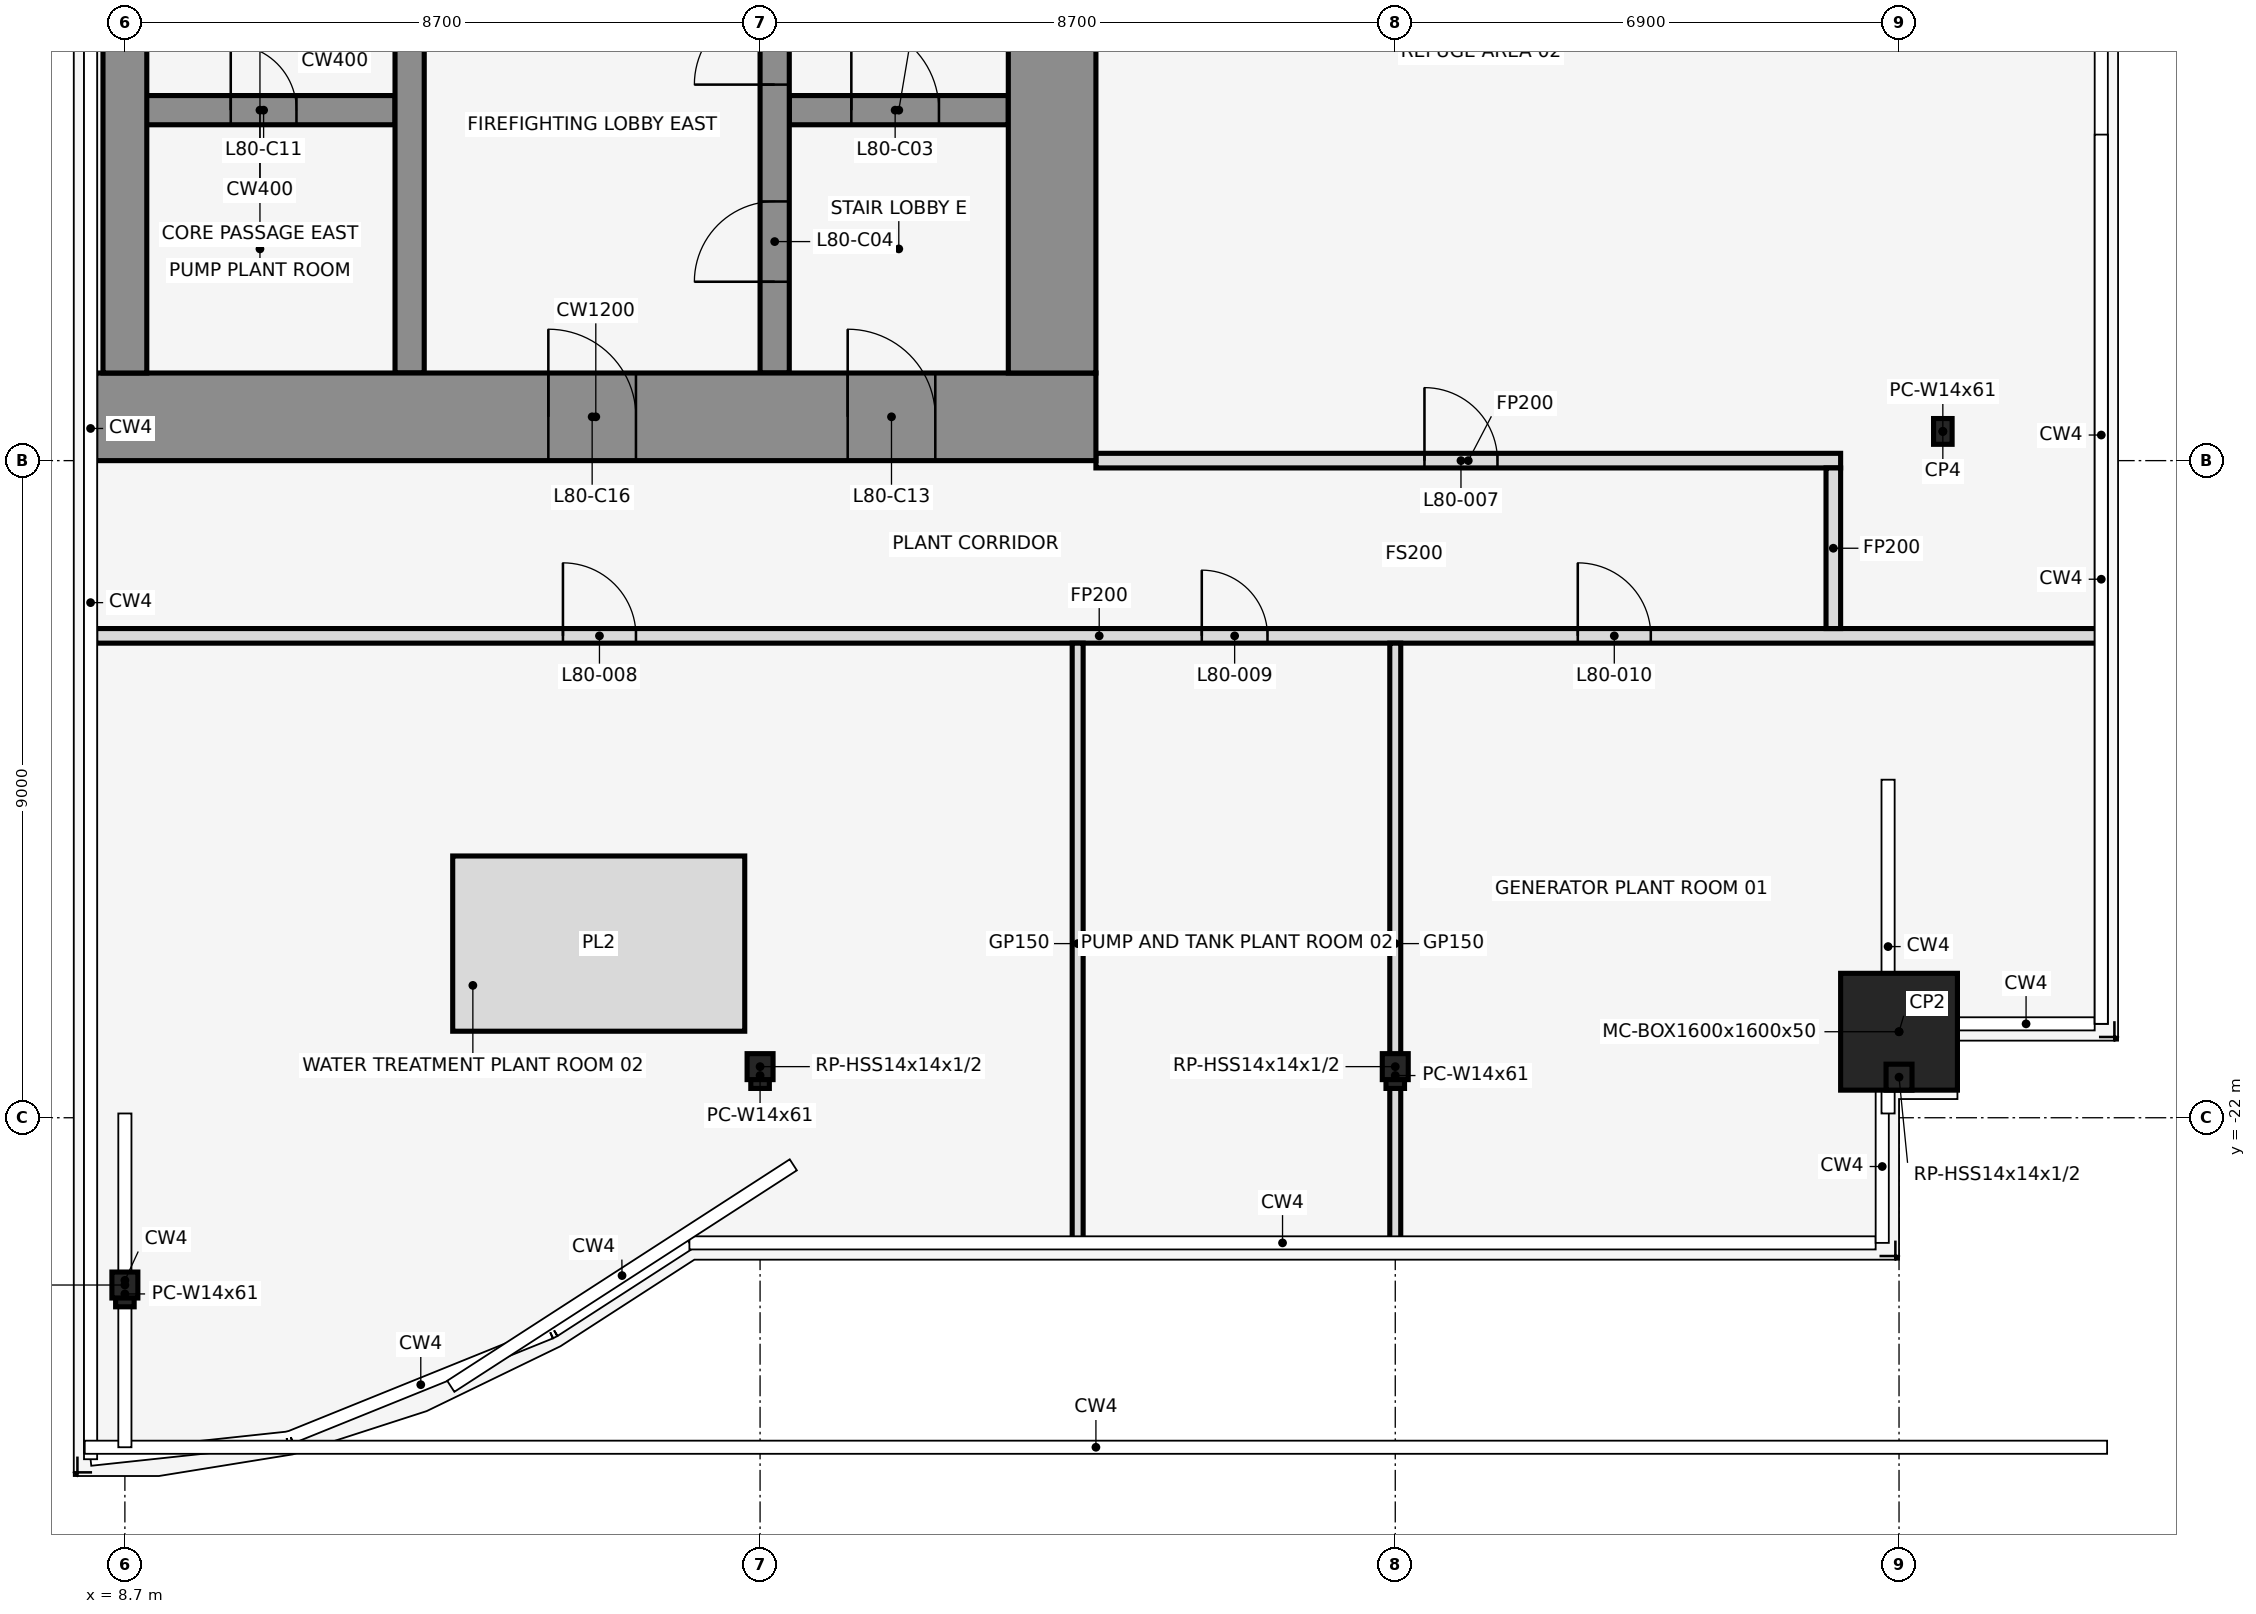
"""IFC4 building model, lengths in metres.
Left out: names, types, materials, properties, quantities, classifications, styles, units other than length and angle.
Written with IfcOpenShell. Run it as: python <this file> out.ifc"""

import sys

from ifc_helpers import new_model, si_unit, direction, frame, frame_2d, origin, origin_2d, place, context, subcontext, project, spatial, rectangle, hollow_rectangle, i_section, extrude, element, fill, save


model = new_model("IFC4")
c1 = context("Model", 3, precision=1e-05, world=origin(), true_north=direction((0.0, 1.0)))
c2 = subcontext(c1, "Body", "Model", "MODEL_VIEW")
j1 = project(units=[si_unit("LENGTHUNIT", "METRE"), si_unit("PLANEANGLEUNIT", "RADIAN")], contexts=[c1])
p1 = place(None, origin())
s1 = spatial("IfcSite", under=j1, at=p1, CompositionType="ELEMENT")
p2 = place(p1, origin())
s2 = spatial("IfcBuilding", under=s1, at=p2, CompositionType="ELEMENT")
p3 = place(p2, frame((0.0, 0.0, 356.9)))
s3 = spatial("IfcBuildingStorey", under=s2, at=p3, CompositionType="ELEMENT", Elevation=356.9)
for number, where, z_axis, x_axis in (
    (1, (8.7, -24.413, 0.0), (0.0, 0.0, 1.0), (1.0, 0.0, 0.0)),
    (2, (17.4, -21.422, 0.0), (0.0, 0.0, 1.0), (1.0, 0.0, 0.0)),
    (3, (26.1, -21.422, 0.0), (0.0, 0.0, 1.0), (1.0, 0.0, 0.0)),
):
    element("IfcColumn", number, at=place(p3, frame(where, z_axis=z_axis, x_axis=x_axis)), inside=s3, PredefinedType="COLUMN", context=c2, shape_type="SweptSolid", body=[
        extrude(i_section(OverallWidth=0.254, OverallDepth=0.353, WebThickness=0.01, FlangeThickness=0.016, at=origin_2d()), origin(), (0.0, 0.0, 1.0), 4.5),
    ])
p4 = place(p3, frame((33.0, -20.822, 0.0), z_axis=(0.0, 0.0, 1.0), x_axis=(1.0, 0.0, 0.0)))
e4 = element("IfcColumn", 4, at=p4, inside=s3, PredefinedType="COLUMN", context=c2, shape_type="SweptSolid", body=[
    extrude(hollow_rectangle(XDim=1.6, YDim=1.6, WallThickness=0.05, at=origin_2d()), origin(), (0.0, 0.0, 1.0), 4.5),
])
p5 = place(p3, frame((33.6, -12.6, 0.0), z_axis=(0.0, 0.0, 1.0), x_axis=(1.0, 0.0, 0.0)))
e5 = element("IfcColumn", 5, at=p5, inside=s3, PredefinedType="COLUMN", context=c2, shape_type="SweptSolid", body=[
    extrude(i_section(OverallWidth=0.254, OverallDepth=0.353, WebThickness=0.01, FlangeThickness=0.016, at=origin_2d()), origin(), (0.0, 0.0, 1.0), 4.5),
])
for number, where, z_axis, x_axis in (
    (6, (8.7, -24.291, 4.5), (0.0, 0.0, 1.0), (1.0, 0.0, 0.0)),
    (7, (17.4, -21.3, 4.5), (0.0, 0.0, 1.0), (1.0, 0.0, 0.0)),
):
    element("IfcColumn", number, at=place(p3, frame(where, z_axis=z_axis, x_axis=x_axis)), inside=s3, PredefinedType="COLUMN", context=c2, shape_type="SweptSolid", body=[
        extrude(hollow_rectangle(XDim=0.356, YDim=0.356, WallThickness=0.012, at=origin_2d()), origin(), (0.0, 0.0, 1.0), 3.682),
    ])
p6 = place(p3, frame((26.1, -21.3, 4.5), z_axis=(0.0, 0.0, 1.0), x_axis=(1.0, 0.0, 0.0)))
e8 = element("IfcColumn", 8, at=p6, inside=s3, PredefinedType="COLUMN", context=c2, shape_type="SweptSolid", body=[
    extrude(hollow_rectangle(XDim=0.356, YDim=0.356, WallThickness=0.012, at=origin_2d()), origin(), (0.0, 0.0, 1.0), 3.365),
])
p7 = place(p3, frame((33.0, -21.444, 4.516), z_axis=(0.0, 0.0, 1.0), x_axis=(1.0, 0.0, 0.0)))
e9 = element("IfcColumn", 9, at=p7, inside=s3, PredefinedType="COLUMN", context=c2, shape_type="SweptSolid", body=[
    extrude(hollow_rectangle(XDim=0.356, YDim=0.356, WallThickness=0.012, at=origin_2d()), origin(), (0.0, 0.0, 1.0), 3.348),
])
p8 = place(p3, frame((15.19, -19.615, 0.0), z_axis=(0.0, 0.0, 1.0), x_axis=(1.0, 0.0, 0.0)))
e10 = element("IfcWall", 10, at=p8, inside=s3, PredefinedType="USERDEFINED", context=c2, shape_type="SweptSolid", body=[
    extrude(rectangle(XDim=4.0, YDim=2.4, at=origin_2d()), origin(), (0.0, 0.0, 1.0), 0.2),
])
p9 = place(p3, frame((8.3, -15.4, 0.0), z_axis=(0.0, 0.0, 1.0), x_axis=(1.0, 0.0, 0.0)))
e11 = element("IfcWall", 11, at=p9, inside=s3, PredefinedType="PARTITIONING", context=c2, shape_type="SweptSolid", body=[
    extrude(rectangle(XDim=27.49, YDim=0.2, at=frame_2d((13.745, 0.0))), origin(), (0.0, 0.0, 1.0), 3.368),
])
p10 = place(p9, frame((6.4, 0.0, 0.0)))
e12 = element("IfcOpeningElement", 12, at=p10, cuts=e11, PredefinedType="OPENING", context=c2, shape_type="SweptSolid", body=[
    extrude(rectangle(XDim=1.0, YDim=2.1, at=frame_2d((0.5, 1.05))), frame((0.0, 0.112, 0.0), z_axis=(0.0, -1.0, 0.0), x_axis=(1.0, 0.0, 0.0)), (0.0, 0.0, 1.0), 0.224),
])
p11 = place(p9, frame((15.15, 0.0, 0.0)))
e13 = element("IfcOpeningElement", 13, at=p11, cuts=e11, PredefinedType="OPENING", context=c2, shape_type="SweptSolid", body=[
    extrude(rectangle(XDim=0.9, YDim=2.1, at=frame_2d((0.45, 1.05))), frame((0.0, 0.112, 0.0), z_axis=(0.0, -1.0, 0.0), x_axis=(1.0, 0.0, 0.0)), (0.0, 0.0, 1.0), 0.224),
])
p12 = place(p9, frame((20.3, 0.0, 0.0)))
e14 = element("IfcOpeningElement", 14, at=p12, cuts=e11, PredefinedType="OPENING", context=c2, shape_type="SweptSolid", body=[
    extrude(rectangle(XDim=1.0, YDim=2.1, at=frame_2d((0.5, 1.05))), frame((0.0, 0.112, 0.0), z_axis=(0.0, -1.0, 0.0), x_axis=(1.0, 0.0, 0.0)), (0.0, 0.0, 1.0), 0.224),
])
p13 = place(p3, frame((22.0, -13.0, 0.0), z_axis=(0.0, 0.0, 1.0), x_axis=(1.0, 0.0, 0.0)))
e15 = element("IfcWall", 15, at=p13, inside=s3, PredefinedType="PARTITIONING", context=c2, shape_type="SweptSolid", body=[
    extrude(rectangle(XDim=10.2, YDim=0.2, at=frame_2d((5.1, 0.0))), origin(), (0.0, 0.0, 1.0), 3.368),
])
p14 = place(p13, frame((4.5, 0.0, 0.0)))
e16 = element("IfcOpeningElement", 16, at=p14, cuts=e15, PredefinedType="OPENING", context=c2, shape_type="SweptSolid", body=[
    extrude(rectangle(XDim=1.0, YDim=2.1, at=frame_2d((0.5, 1.05))), frame((0.0, 0.112, 0.0), z_axis=(0.0, -1.0, 0.0), x_axis=(1.0, 0.0, 0.0)), (0.0, 0.0, 1.0), 0.224),
])
for number, where, z_axis, x_axis in (
    (17, (21.75, -23.73, 0.0), (0.0, 0.0, 1.0), (0.0, 1.0, 0.0)),
    (18, (26.1, -23.73, 0.0), (0.0, 0.0, 1.0), (0.0, 1.0, 0.0)),
):
    element("IfcWall", number, at=place(p3, frame(where, z_axis=z_axis, x_axis=x_axis)), inside=s3, PredefinedType="PARTITIONING", context=c2, shape_type="SweptSolid", body=[
        extrude(rectangle(XDim=8.23, YDim=0.15, at=frame_2d((4.115, 0.0))), origin(), (0.0, 0.0, 1.0), 3.368),
    ])
p15 = place(p3, frame((32.1, -15.3, 0.0), z_axis=(0.0, 0.0, 1.0), x_axis=(0.0, 1.0, 0.0)))
e19 = element("IfcWall", 19, at=p15, inside=s3, PredefinedType="PARTITIONING", context=c2, shape_type="SweptSolid", body=[
    extrude(rectangle(XDim=2.2, YDim=0.2, at=frame_2d((1.1, 0.0))), origin(), (0.0, 0.0, 1.0), 3.368),
])
p16 = place(p3, frame((8.7, -8.2, 0.0), z_axis=(0.0, 0.0, 1.0), x_axis=(1.0, 0.0, 0.0)))
e20 = element("IfcWall", 20, at=p16, inside=s3, PredefinedType="SHEAR", context=c2, shape_type="SweptSolid", body=[
    extrude(rectangle(XDim=3.7, YDim=0.4, at=frame_2d((1.85, 0.0))), origin(), (0.0, 0.0, 1.0), 4.5),
])
p17 = place(p16, frame((1.45, 0.0, 0.0)))
e21 = element("IfcOpeningElement", 21, at=p17, cuts=e20, PredefinedType="OPENING", context=c2, shape_type="SweptSolid", body=[
    extrude(rectangle(XDim=0.9, YDim=2.1, at=frame_2d((0.45, 1.05))), frame((0.0, 0.212, 0.0), z_axis=(0.0, -1.0, 0.0), x_axis=(1.0, 0.0, 0.0)), (0.0, 0.0, 1.0), 0.424),
])
p18 = place(p3, frame((17.8, -8.2, 0.0), z_axis=(0.0, 0.0, 1.0), x_axis=(1.0, 0.0, 0.0)))
e22 = element("IfcWall", 22, at=p18, inside=s3, PredefinedType="SHEAR", context=c2, shape_type="SweptSolid", body=[
    extrude(rectangle(XDim=3.0, YDim=0.4, at=frame_2d((1.5, 0.0))), origin(), (0.0, 0.0, 1.0), 4.5),
])
p19 = place(p18, frame((0.85, 0.0, 0.0)))
e23 = element("IfcOpeningElement", 23, at=p19, cuts=e22, PredefinedType="OPENING", context=c2, shape_type="SweptSolid", body=[
    extrude(rectangle(XDim=1.2, YDim=2.1, at=frame_2d((0.6, 1.05))), frame((0.0, 0.212, 0.0), z_axis=(0.0, -1.0, 0.0), x_axis=(1.0, 0.0, 0.0)), (0.0, 0.0, 1.0), 0.424),
])
p20 = place(p3, frame((12.6, -11.8, 0.0), z_axis=(0.0, 0.0, 1.0), x_axis=(0.0, 1.0, 0.0)))
e24 = element("IfcWall", 24, at=p20, inside=s3, PredefinedType="SHEAR", context=c2, shape_type="SweptSolid", body=[
    extrude(rectangle(XDim=10.6, YDim=0.4, at=frame_2d((5.3, 0.0))), origin(), (0.0, 0.0, 1.0), 4.5),
])
p21 = place(p20, frame((4.75, 0.0, 0.0)))
e25 = element("IfcOpeningElement", 25, at=p21, cuts=e24, PredefinedType="OPENING", context=c2, shape_type="SweptSolid", body=[
    extrude(rectangle(XDim=1.1, YDim=2.1, at=frame_2d((0.55, 1.05))), frame((0.0, 0.212, 0.0), z_axis=(0.0, -1.0, 0.0), x_axis=(1.0, 0.0, 0.0)), (0.0, 0.0, 1.0), 0.424),
])
p22 = place(p3, frame((17.6, -11.8, 0.0), z_axis=(0.0, 0.0, 1.0), x_axis=(0.0, 1.0, 0.0)))
e26 = element("IfcWall", 26, at=p22, inside=s3, PredefinedType="SHEAR", context=c2, shape_type="SweptSolid", body=[
    extrude(rectangle(XDim=10.6, YDim=0.4, at=frame_2d((5.3, 0.0))), origin(), (0.0, 0.0, 1.0), 4.5),
])
p23 = place(p22, frame((1.25, 0.0, 0.0)))
e27 = element("IfcOpeningElement", 27, at=p23, cuts=e26, PredefinedType="OPENING", context=c2, shape_type="SweptSolid", body=[
    extrude(rectangle(XDim=1.1, YDim=2.1, at=frame_2d((0.55, 1.05))), frame((0.0, 0.212, 0.0), z_axis=(0.0, -1.0, 0.0), x_axis=(1.0, 0.0, 0.0)), (0.0, 0.0, 1.0), 0.424),
])
p24 = place(p22, frame((3.95, 0.0, 0.0)))
e28 = element("IfcOpeningElement", 28, at=p24, cuts=e26, PredefinedType="OPENING", context=c2, shape_type="SweptSolid", body=[
    extrude(rectangle(XDim=1.1, YDim=2.1, at=frame_2d((0.55, 1.05))), frame((0.0, 0.212, 0.0), z_axis=(0.0, -1.0, 0.0), x_axis=(1.0, 0.0, 0.0)), (0.0, 0.0, 1.0), 0.424),
])
p25 = place(p3, frame((8.3, -12.4, 0.0), z_axis=(0.0, 0.0, 1.0), x_axis=(1.0, 0.0, 0.0)))
e29 = element("IfcWall", 29, at=p25, inside=s3, PredefinedType="SHEAR", context=c2, shape_type="SweptSolid", body=[
    extrude(rectangle(XDim=13.7, YDim=1.2, at=frame_2d((6.85, 0.0))), origin(), (0.0, 0.0, 1.0), 4.5),
])
p26 = place(p25, frame((10.3, 0.0, 0.0)))
e30 = element("IfcOpeningElement", 30, at=p26, cuts=e29, PredefinedType="OPENING", context=c2, shape_type="SweptSolid", body=[
    extrude(rectangle(XDim=1.2, YDim=2.1, at=frame_2d((0.6, 1.05))), frame((0.0, 0.612, 0.0), z_axis=(0.0, -1.0, 0.0), x_axis=(1.0, 0.0, 0.0)), (0.0, 0.0, 1.0), 1.224),
])
p27 = place(p25, frame((6.2, 0.0, 0.0)))
e31 = element("IfcOpeningElement", 31, at=p27, cuts=e29, PredefinedType="OPENING", context=c2, shape_type="SweptSolid", body=[
    extrude(rectangle(XDim=1.2, YDim=2.1, at=frame_2d((0.6, 1.05))), frame((0.0, 0.612, 0.0), z_axis=(0.0, -1.0, 0.0), x_axis=(1.0, 0.0, 0.0)), (0.0, 0.0, 1.0), 1.224),
])
p28 = place(p3, frame((21.4, -11.8, 0.0), z_axis=(0.0, 0.0, 1.0), x_axis=(0.0, 1.0, 0.0)))
e32 = element("IfcWall", 32, at=p28, inside=s3, PredefinedType="SHEAR", context=c2, shape_type="SweptSolid", body=[
    extrude(rectangle(XDim=10.6, YDim=1.2, at=frame_2d((5.3, 0.0))), origin(), (0.0, 0.0, 1.0), 4.5),
])
p29 = place(p3, frame((8.7, -11.8, 0.0), z_axis=(0.0, 0.0, 1.0), x_axis=(0.0, 1.0, 0.0)))
e33 = element("IfcWall", 33, at=p29, inside=s3, PredefinedType="SHEAR", context=c2, shape_type="SweptSolid", body=[
    extrude(rectangle(XDim=10.6, YDim=0.6, at=frame_2d((5.3, 0.0))), origin(), (0.0, 0.0, 1.0), 4.5),
])
p30 = place(p14, origin())
e34 = element("IfcDoor", 34, at=p30, inside=s3, OperationType="SINGLE_SWING_LEFT", PredefinedType="DOOR", context=c2, shape_type="SweptSolid", body=[
    extrude(rectangle(XDim=1.0, YDim=2.1, at=frame_2d((0.5, 1.05))), frame((0.0, 0.025, 0.0), z_axis=(0.0, -1.0, 0.0), x_axis=(1.0, 0.0, 0.0)), (0.0, 0.0, 1.0), 0.05),
])
fill(e16, e34)
p31 = place(p10, frame((1.0, 0.0, 0.0), z_axis=(0.0, 0.0, 1.0), x_axis=(-1.0, 0.0, 0.0)))
e35 = element("IfcDoor", 35, at=p31, inside=s3, OperationType="SINGLE_SWING_RIGHT", PredefinedType="DOOR", context=c2, shape_type="SweptSolid", body=[
    extrude(rectangle(XDim=1.0, YDim=2.1, at=frame_2d((0.5, 1.05))), frame((0.0, 0.025, 0.0), z_axis=(0.0, -1.0, 0.0), x_axis=(1.0, 0.0, 0.0)), (0.0, 0.0, 1.0), 0.05),
])
fill(e12, e35)
p32 = place(p11, frame((0.9, 0.0, 0.0), z_axis=(0.0, 0.0, 1.0), x_axis=(-1.0, 0.0, 0.0)))
e36 = element("IfcDoor", 36, at=p32, inside=s3, OperationType="SINGLE_SWING_RIGHT", PredefinedType="DOOR", context=c2, shape_type="SweptSolid", body=[
    extrude(rectangle(XDim=0.9, YDim=2.1, at=frame_2d((0.45, 1.05))), frame((0.0, 0.025, 0.0), z_axis=(0.0, -1.0, 0.0), x_axis=(1.0, 0.0, 0.0)), (0.0, 0.0, 1.0), 0.05),
])
fill(e13, e36)
p33 = place(p12, frame((1.0, 0.0, 0.0), z_axis=(0.0, 0.0, 1.0), x_axis=(-1.0, 0.0, 0.0)))
e37 = element("IfcDoor", 37, at=p33, inside=s3, OperationType="SINGLE_SWING_LEFT", PredefinedType="DOOR", context=c2, shape_type="SweptSolid", body=[
    extrude(rectangle(XDim=1.0, YDim=2.1, at=frame_2d((0.5, 1.05))), frame((0.0, 0.025, 0.0), z_axis=(0.0, -1.0, 0.0), x_axis=(1.0, 0.0, 0.0)), (0.0, 0.0, 1.0), 0.05),
])
fill(e14, e37)
p34 = place(p19, origin())
e38 = element("IfcDoor", 38, at=p34, inside=s3, OperationType="SINGLE_SWING_LEFT", PredefinedType="DOOR", context=c2, shape_type="SweptSolid", body=[
    extrude(rectangle(XDim=1.2, YDim=2.1, at=frame_2d((0.6, 1.05))), frame((0.0, 0.025, 0.0), z_axis=(0.0, -1.0, 0.0), x_axis=(1.0, 0.0, 0.0)), (0.0, 0.0, 1.0), 0.05),
])
fill(e23, e38)
p35 = place(p23, origin())
e39 = element("IfcDoor", 39, at=p35, inside=s3, OperationType="SINGLE_SWING_RIGHT", PredefinedType="DOOR", context=c2, shape_type="SweptSolid", body=[
    extrude(rectangle(XDim=1.1, YDim=2.1, at=frame_2d((0.55, 1.05))), frame((0.0, 0.025, 0.0), z_axis=(0.0, -1.0, 0.0), x_axis=(1.0, 0.0, 0.0)), (0.0, 0.0, 1.0), 0.05),
])
fill(e27, e39)
p36 = place(p24, origin())
e40 = element("IfcDoor", 40, at=p36, inside=s3, OperationType="SINGLE_SWING_RIGHT", PredefinedType="DOOR", context=c2, shape_type="SweptSolid", body=[
    extrude(rectangle(XDim=1.1, YDim=2.1, at=frame_2d((0.55, 1.05))), frame((0.0, 0.025, 0.0), z_axis=(0.0, -1.0, 0.0), x_axis=(1.0, 0.0, 0.0)), (0.0, 0.0, 1.0), 0.05),
])
fill(e28, e40)
p37 = place(p17, frame((0.9, 0.0, 0.0), z_axis=(0.0, 0.0, 1.0), x_axis=(-1.0, 0.0, 0.0)))
e41 = element("IfcDoor", 41, at=p37, inside=s3, OperationType="SINGLE_SWING_RIGHT", PredefinedType="DOOR", context=c2, shape_type="SweptSolid", body=[
    extrude(rectangle(XDim=0.9, YDim=2.1, at=frame_2d((0.45, 1.05))), frame((0.0, 0.025, 0.0), z_axis=(0.0, -1.0, 0.0), x_axis=(1.0, 0.0, 0.0)), (0.0, 0.0, 1.0), 0.05),
])
fill(e21, e41)
p38 = place(p26, frame((1.2, 0.0, 0.0), z_axis=(0.0, 0.0, 1.0), x_axis=(-1.0, 0.0, 0.0)))
e42 = element("IfcDoor", 42, at=p38, inside=s3, OperationType="SINGLE_SWING_RIGHT", PredefinedType="DOOR", context=c2, shape_type="SweptSolid", body=[
    extrude(rectangle(XDim=1.2, YDim=2.1, at=frame_2d((0.6, 1.05))), frame((0.0, 0.025, 0.0), z_axis=(0.0, -1.0, 0.0), x_axis=(1.0, 0.0, 0.0)), (0.0, 0.0, 1.0), 0.05),
])
fill(e30, e42)
p39 = place(p27, frame((1.2, 0.0, 0.0), z_axis=(0.0, 0.0, 1.0), x_axis=(-1.0, 0.0, 0.0)))
e43 = element("IfcDoor", 43, at=p39, inside=s3, OperationType="SINGLE_SWING_RIGHT", PredefinedType="DOOR", context=c2, shape_type="SweptSolid", body=[
    extrude(rectangle(XDim=1.2, YDim=2.1, at=frame_2d((0.6, 1.05))), frame((0.0, 0.025, 0.0), z_axis=(0.0, -1.0, 0.0), x_axis=(1.0, 0.0, 0.0)), (0.0, 0.0, 1.0), 0.05),
])
fill(e31, e43)
save(model, sys.argv[1])
